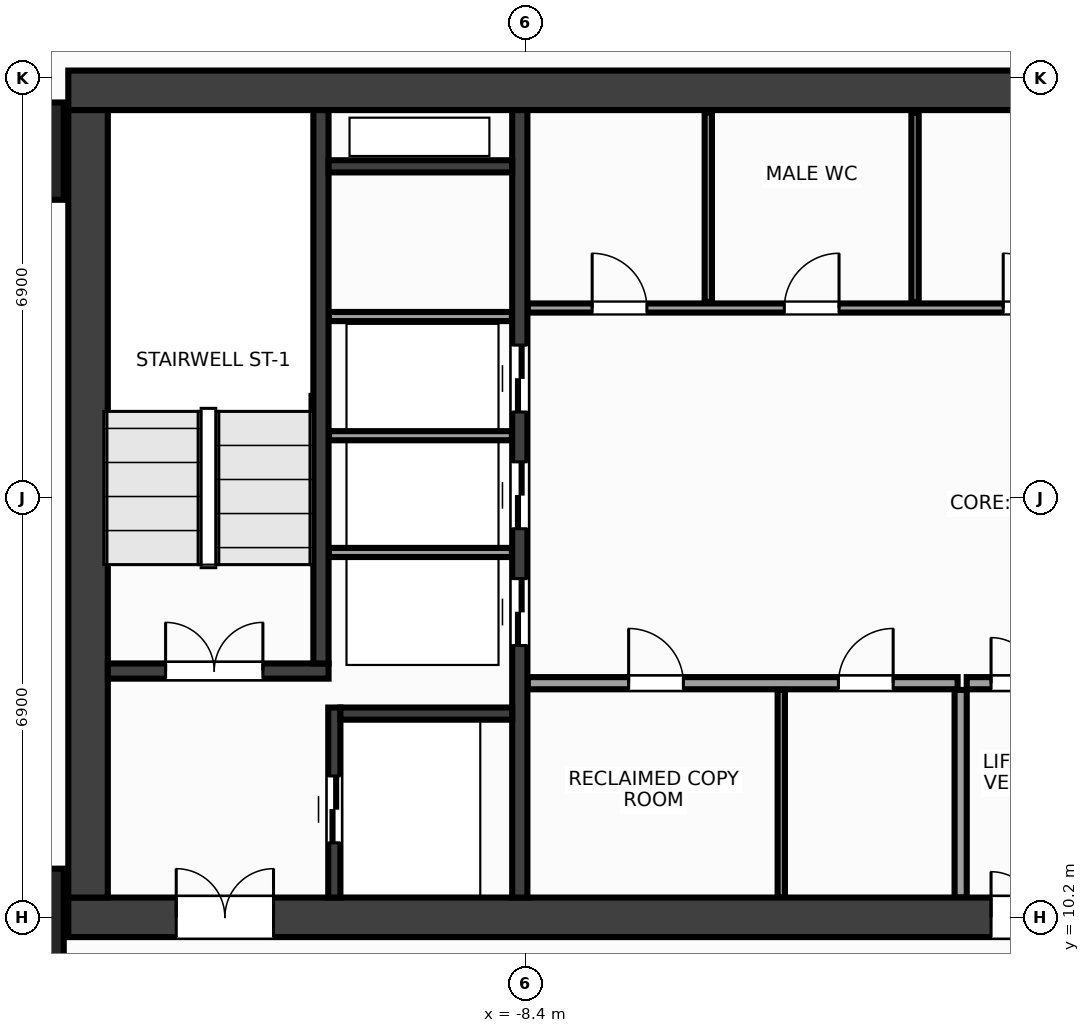
"""IFC4 building model, lengths in metres.
Left out: names, types, materials, properties, quantities, classifications, styles, units other than length and angle.
Written with IfcOpenShell. Run it as: python <this file> out.ifc"""

import sys

from ifc_helpers import new_model, si_unit, direction, frame, frame_2d, origin, origin_2d, place, context, subcontext, project, spatial, rectangle, extrude, source, transform, mapped, element, fill, save


model = new_model("IFC4")
c1 = context("Model", 3, precision=1e-05, world=origin(), true_north=direction((0.0, 1.0)))
c2 = subcontext(c1, "Body", "Model", "MODEL_VIEW")
j1 = project(units=[si_unit("LENGTHUNIT", "METRE"), si_unit("PLANEANGLEUNIT", "RADIAN")], contexts=[c1])
p1 = place(None, origin())
s1 = spatial("IfcSite", under=j1, at=p1, CompositionType="ELEMENT")
p2 = place(p1, origin())
s2 = spatial("IfcBuilding", under=s1, at=p2, CompositionType="ELEMENT")
p3 = place(p2, frame((0.0, 0.0, 160.4)))
s3 = spatial("IfcBuildingStorey", under=s2, at=p3, CompositionType="ELEMENT", Elevation=160.4)
m1 = source(origin(), c2, "Body", "SweptSolid", [
    extrude(rectangle(XDim=31.85, YDim=0.65, at=frame_2d((15.925, 0.0))), origin(), (0.0, 0.0, 1.0), 3.6),
])
p4 = place(p3, frame((-15.925, 23.8, 0.0), z_axis=(0.0, 0.0, 1.0), x_axis=(1.0, 0.0, 0.0)))
e1 = element("IfcWall", 1, at=p4, inside=s3, PredefinedType="SHEAR", context=c2, shape_type="MappedRepresentation", body=[
    mapped(m1, transform((0.0, 0.0, 0.0), x_axis=(1.0, 0.0, 0.0), y_axis=(0.0, 1.0, 0.0), z_axis=(0.0, 0.0, 1.0), scale=1.0)),
])
p5 = place(p3, frame((-15.925, 10.2, 0.0), z_axis=(0.0, 0.0, 1.0), x_axis=(1.0, 0.0, 0.0)))
e2 = element("IfcWall", 2, at=p5, inside=s3, PredefinedType="SHEAR", context=c2, shape_type="MappedRepresentation", body=[
    mapped(m1, transform((0.0, 0.0, 0.0), x_axis=(1.0, 0.0, 0.0), y_axis=(0.0, 1.0, 0.0), z_axis=(0.0, 0.0, 1.0), scale=1.0)),
])
p6 = place(p5, frame((1.775, 0.0, 0.0)))
e3 = element("IfcOpeningElement", 3, at=p6, cuts=e2, PredefinedType="OPENING", context=c2, shape_type="SweptSolid", body=[
    extrude(rectangle(XDim=1.6, YDim=2.15, at=frame_2d((0.8, 1.075))), frame((0.0, 0.337, 0.0), z_axis=(0.0, -1.0, 0.0), x_axis=(1.0, 0.0, 0.0)), (0.0, 0.0, 1.0), 0.674),
])
p7 = place(p5, frame((28.475, 0.0, 0.0)))
e4 = element("IfcOpeningElement", 4, at=p7, cuts=e2, PredefinedType="OPENING", context=c2, shape_type="SweptSolid", body=[
    extrude(rectangle(XDim=1.6, YDim=2.15, at=frame_2d((0.8, 1.075))), frame((0.0, 0.337, 0.0), z_axis=(0.0, -1.0, 0.0), x_axis=(1.0, 0.0, 0.0)), (0.0, 0.0, 1.0), 0.674),
])
p8 = place(p5, frame((15.175, 0.0, 0.0)))
e5 = element("IfcOpeningElement", 5, at=p8, cuts=e2, PredefinedType="OPENING", context=c2, shape_type="SweptSolid", body=[
    extrude(rectangle(XDim=1.5, YDim=2.2, at=frame_2d((0.75, 1.1))), frame((0.0, 0.337, 0.0), z_axis=(0.0, -1.0, 0.0), x_axis=(1.0, 0.0, 0.0)), (0.0, 0.0, 1.0), 0.674),
])
m2 = source(origin(), c2, "Body", "SweptSolid", [
    extrude(rectangle(XDim=12.95, YDim=0.65, at=frame_2d((6.475, 0.0))), origin(), (0.0, 0.0, 1.0), 3.6),
])
p9 = place(p3, frame((-15.6, 10.525, 0.0), z_axis=(0.0, 0.0, 1.0), x_axis=(0.0, 1.0, 0.0)))
e6 = element("IfcWall", 6, at=p9, inside=s3, PredefinedType="SHEAR", context=c2, shape_type="MappedRepresentation", body=[
    mapped(m2, transform((0.0, 0.0, 0.0), x_axis=(1.0, 0.0, 0.0), y_axis=(0.0, 1.0, 0.0), z_axis=(0.0, 0.0, 1.0), scale=1.0)),
])
m3 = source(origin(), c2, "Body", "SweptSolid", [
    extrude(rectangle(XDim=12.95, YDim=0.25, at=frame_2d((6.475, 0.0))), origin(), (0.0, 0.0, 1.0), 3.6),
])
p10 = place(p3, frame((-8.5, 10.525, 0.0), z_axis=(0.0, 0.0, 1.0), x_axis=(0.0, 1.0, 0.0)))
e7 = element("IfcWall", 7, at=p10, inside=s3, PredefinedType="SHEAR", context=c2, shape_type="MappedRepresentation", body=[
    mapped(m3, transform((0.0, 0.0, 0.0), x_axis=(1.0, 0.0, 0.0), y_axis=(0.0, 1.0, 0.0), z_axis=(0.0, 0.0, 1.0), scale=1.0)),
])
p11 = place(p10, frame((4.145, 0.0, 0.0)))
e8 = element("IfcOpeningElement", 8, at=p11, cuts=e7, PredefinedType="OPENING", context=c2, shape_type="SweptSolid", body=[
    extrude(rectangle(XDim=1.1, YDim=2.15, at=frame_2d((0.55, 1.075))), frame((0.0, 0.137, 0.0), z_axis=(0.0, -1.0, 0.0), x_axis=(1.0, 0.0, 0.0)), (0.0, 0.0, 1.0), 0.274),
])
p12 = place(p10, frame((6.065, 0.0, 0.0)))
e9 = element("IfcOpeningElement", 9, at=p12, cuts=e7, PredefinedType="OPENING", context=c2, shape_type="SweptSolid", body=[
    extrude(rectangle(XDim=1.1, YDim=2.15, at=frame_2d((0.55, 1.075))), frame((0.0, 0.137, 0.0), z_axis=(0.0, -1.0, 0.0), x_axis=(1.0, 0.0, 0.0)), (0.0, 0.0, 1.0), 0.274),
])
p13 = place(p10, frame((7.985, 0.0, 0.0)))
e10 = element("IfcOpeningElement", 10, at=p13, cuts=e7, PredefinedType="OPENING", context=c2, shape_type="SweptSolid", body=[
    extrude(rectangle(XDim=1.1, YDim=2.15, at=frame_2d((0.55, 1.075))), frame((0.0, 0.137, 0.0), z_axis=(0.0, -1.0, 0.0), x_axis=(1.0, 0.0, 0.0)), (0.0, 0.0, 1.0), 0.274),
])
m4 = source(origin(), c2, "Body", "SweptSolid", [
    extrude(rectangle(XDim=3.63, YDim=0.25, at=frame_2d((1.815, 0.0))), origin(), (0.0, 0.0, 1.0), 3.6),
])
p14 = place(p3, frame((-15.275, 14.25, 0.0), z_axis=(0.0, 0.0, 1.0), x_axis=(1.0, 0.0, 0.0)))
e11 = element("IfcWall", 11, at=p14, inside=s3, PredefinedType="SHEAR", context=c2, shape_type="MappedRepresentation", body=[
    mapped(m4, transform((0.0, 0.0, 0.0), x_axis=(1.0, 0.0, 0.0), y_axis=(0.0, 1.0, 0.0), z_axis=(0.0, 0.0, 1.0), scale=1.0)),
])
p15 = place(p14, frame((0.95, 0.0, 0.0)))
e12 = element("IfcOpeningElement", 12, at=p15, cuts=e11, PredefinedType="OPENING", context=c2, shape_type="SweptSolid", body=[
    extrude(rectangle(XDim=1.6, YDim=2.15, at=frame_2d((0.8, 1.075))), frame((0.0, 0.137, 0.0), z_axis=(0.0, -1.0, 0.0), x_axis=(1.0, 0.0, 0.0)), (0.0, 0.0, 1.0), 0.274),
])
m5 = source(origin(), c2, "Body", "SweptSolid", [
    extrude(rectangle(XDim=9.1, YDim=0.25, at=frame_2d((4.55, 0.0))), origin(), (0.0, 0.0, 1.0), 3.6),
])
p16 = place(p3, frame((-11.77, 14.375, 0.0), z_axis=(0.0, 0.0, 1.0), x_axis=(0.0, 1.0, 0.0)))
e13 = element("IfcWall", 13, at=p16, inside=s3, PredefinedType="SHEAR", context=c2, shape_type="MappedRepresentation", body=[
    mapped(m5, transform((0.0, 0.0, 0.0), x_axis=(1.0, 0.0, 0.0), y_axis=(0.0, 1.0, 0.0), z_axis=(0.0, 0.0, 1.0), scale=1.0)),
])
m6 = source(origin(), c2, "Body", "SweptSolid", [
    extrude(rectangle(XDim=3.125, YDim=0.2, at=frame_2d((1.562, 0.0))), origin(), (0.0, 0.0, 1.0), 3.6),
])
p17 = place(p3, frame((-11.55, 10.525, 0.0), z_axis=(0.0, 0.0, 1.0), x_axis=(0.0, 1.0, 0.0)))
e14 = element("IfcWall", 14, at=p17, inside=s3, PredefinedType="SHEAR", context=c2, shape_type="MappedRepresentation", body=[
    mapped(m6, transform((0.0, 0.0, 0.0), x_axis=(1.0, 0.0, 0.0), y_axis=(0.0, 1.0, 0.0), z_axis=(0.0, 0.0, 1.0), scale=1.0)),
])
p18 = place(p17, frame((0.9, 0.0, 0.0)))
e15 = element("IfcOpeningElement", 15, at=p18, cuts=e14, PredefinedType="OPENING", context=c2, shape_type="SweptSolid", body=[
    extrude(rectangle(XDim=1.1, YDim=2.15, at=frame_2d((0.55, 1.075))), frame((0.0, 0.112, 0.0), z_axis=(0.0, -1.0, 0.0), x_axis=(1.0, 0.0, 0.0)), (0.0, 0.0, 1.0), 0.224),
])
m7 = source(origin(), c2, "Body", "SweptSolid", [
    extrude(rectangle(XDim=2.825, YDim=0.2, at=frame_2d((1.413, 0.0))), origin(), (0.0, 0.0, 1.0), 3.6),
])
p19 = place(p3, frame((-11.45, 13.55, 0.0), z_axis=(0.0, 0.0, 1.0), x_axis=(1.0, 0.0, 0.0)))
e16 = element("IfcWall", 16, at=p19, inside=s3, PredefinedType="SHEAR", context=c2, shape_type="MappedRepresentation", body=[
    mapped(m7, transform((0.0, 0.0, 0.0), x_axis=(1.0, 0.0, 0.0), y_axis=(0.0, 1.0, 0.0), z_axis=(0.0, 0.0, 1.0), scale=1.0)),
])
m8 = source(origin(), c2, "Body", "SweptSolid", [
    extrude(rectangle(XDim=3.02, YDim=0.2, at=frame_2d((1.51, 0.0))), origin(), (0.0, 0.0, 1.0), 3.6),
])
p20 = place(p3, frame((-11.645, 22.55, 0.0), z_axis=(0.0, 0.0, 1.0), x_axis=(1.0, 0.0, 0.0)))
e17 = element("IfcWall", 17, at=p20, inside=s3, PredefinedType="SHEAR", context=c2, shape_type="MappedRepresentation", body=[
    mapped(m8, transform((0.0, 0.0, 0.0), x_axis=(1.0, 0.0, 0.0), y_axis=(0.0, 1.0, 0.0), z_axis=(0.0, 0.0, 1.0), scale=1.0)),
])
m9 = source(origin(), c2, "Body", "SweptSolid", [
    extrude(rectangle(XDim=1.6, YDim=1.6, at=origin_2d()), origin(), (0.0, 0.0, 1.0), 3.6),
])
for number, where, z_axis, x_axis in (
    (18, (-16.8, 10.2, 0.0), (0.0, 0.0, 1.0), (1.0, 0.0, 0.0)),
    (19, (-16.8, 22.8, 0.0), (0.0, 0.0, 1.0), (1.0, 0.0, 0.0)),
):
    element("IfcColumn", number, at=place(p3, frame(where, z_axis=z_axis, x_axis=x_axis)), inside=s3, PredefinedType="COLUMN", context=c2, shape_type="MappedRepresentation", body=[
        mapped(m9, transform((0.0, 0.0, 0.0), x_axis=(1.0, 0.0, 0.0), y_axis=(0.0, 1.0, 0.0), z_axis=(0.0, 0.0, 1.0), scale=1.0)),
    ])
m10 = source(origin(), c2, "Body", "SweptSolid", [
    extrude(rectangle(XDim=3.01, YDim=0.15, at=frame_2d((1.505, 0.0))), origin(), (0.0, 0.0, 1.0), 3.38),
])
for number, where, z_axis, x_axis in (
    (20, (-11.64, 16.2, 0.0), (0.0, 0.0, 1.0), (1.0, 0.0, 0.0)),
    (21, (-11.64, 18.12, 0.0), (0.0, 0.0, 1.0), (1.0, 0.0, 0.0)),
    (22, (-11.64, 20.08, 0.0), (0.0, 0.0, 1.0), (1.0, 0.0, 0.0)),
):
    element("IfcWall", number, at=place(p3, frame(where, z_axis=z_axis, x_axis=x_axis)), inside=s3, PredefinedType="PARTITIONING", context=c2, shape_type="MappedRepresentation", body=[
        mapped(m10, transform((0.0, 0.0, 0.0), x_axis=(1.0, 0.0, 0.0), y_axis=(0.0, 1.0, 0.0), z_axis=(0.0, 0.0, 1.0), scale=1.0)),
    ])
m11 = source(origin(), c2, "Body", "SweptSolid", [
    extrude(rectangle(XDim=7.07, YDim=0.2, at=frame_2d((3.535, 0.0))), origin(), (0.0, 0.0, 1.0), 3.38),
])
p21 = place(p3, frame((-8.37, 14.05, 0.0), z_axis=(0.0, 0.0, 1.0), x_axis=(1.0, 0.0, 0.0)))
e23 = element("IfcWall", 23, at=p21, inside=s3, PredefinedType="PARTITIONING", context=c2, shape_type="MappedRepresentation", body=[
    mapped(m11, transform((0.0, 0.0, 0.0), x_axis=(1.0, 0.0, 0.0), y_axis=(0.0, 1.0, 0.0), z_axis=(0.0, 0.0, 1.0), scale=1.0)),
])
p22 = place(p21, frame((1.66, 0.0, 0.0)))
e24 = element("IfcOpeningElement", 24, at=p22, cuts=e23, PredefinedType="OPENING", context=c2, shape_type="SweptSolid", body=[
    extrude(rectangle(XDim=0.9, YDim=2.15, at=frame_2d((0.45, 1.075))), frame((0.0, 0.112, 0.0), z_axis=(0.0, -1.0, 0.0), x_axis=(1.0, 0.0, 0.0)), (0.0, 0.0, 1.0), 0.224),
])
p23 = place(p21, frame((5.11, 0.0, 0.0)))
e25 = element("IfcOpeningElement", 25, at=p23, cuts=e23, PredefinedType="OPENING", context=c2, shape_type="SweptSolid", body=[
    extrude(rectangle(XDim=0.9, YDim=2.15, at=frame_2d((0.45, 1.075))), frame((0.0, 0.112, 0.0), z_axis=(0.0, -1.0, 0.0), x_axis=(1.0, 0.0, 0.0)), (0.0, 0.0, 1.0), 0.224),
])
m12 = source(origin(), c2, "Body", "SweptSolid", [
    extrude(rectangle(XDim=3.415, YDim=0.2, at=frame_2d((1.708, 0.0))), origin(), (0.0, 0.0, 1.0), 3.38),
])
p24 = place(p3, frame((-1.25, 10.525, 0.0), z_axis=(0.0, 0.0, 1.0), x_axis=(0.0, 1.0, 0.0)))
e26 = element("IfcWall", 26, at=p24, inside=s3, PredefinedType="PARTITIONING", context=c2, shape_type="MappedRepresentation", body=[
    mapped(m12, transform((0.0, 0.0, 0.0), x_axis=(1.0, 0.0, 0.0), y_axis=(0.0, 1.0, 0.0), z_axis=(0.0, 0.0, 1.0), scale=1.0)),
])
m13 = source(origin(), c2, "Body", "SweptSolid", [
    extrude(rectangle(XDim=2.3, YDim=0.2, at=frame_2d((1.15, 0.0))), origin(), (0.0, 0.0, 1.0), 3.38),
])
p25 = place(p3, frame((-1.15, 14.05, 0.0), z_axis=(0.0, 0.0, 1.0), x_axis=(1.0, 0.0, 0.0)))
e27 = element("IfcWall", 27, at=p25, inside=s3, PredefinedType="PARTITIONING", context=c2, shape_type="MappedRepresentation", body=[
    mapped(m13, transform((0.0, 0.0, 0.0), x_axis=(1.0, 0.0, 0.0), y_axis=(0.0, 1.0, 0.0), z_axis=(0.0, 0.0, 1.0), scale=1.0)),
])
p26 = place(p25, frame((0.4, 0.0, 0.0)))
e28 = element("IfcOpeningElement", 28, at=p26, cuts=e27, PredefinedType="OPENING", context=c2, shape_type="SweptSolid", body=[
    extrude(rectangle(XDim=1.5, YDim=2.2, at=frame_2d((0.75, 1.1))), frame((0.0, 0.112, 0.0), z_axis=(0.0, -1.0, 0.0), x_axis=(1.0, 0.0, 0.0)), (0.0, 0.0, 1.0), 0.224),
])
m14 = source(origin(), c2, "Body", "SweptSolid", [
    extrude(rectangle(XDim=14.59, YDim=0.15, at=frame_2d((7.295, 0.0))), origin(), (0.0, 0.0, 1.0), 3.38),
])
p27 = place(p3, frame((-8.37, 20.22, 0.0), z_axis=(0.0, 0.0, 1.0), x_axis=(1.0, 0.0, 0.0)))
e29 = element("IfcWall", 29, at=p27, inside=s3, PredefinedType="PARTITIONING", context=c2, shape_type="MappedRepresentation", body=[
    mapped(m14, transform((0.0, 0.0, 0.0), x_axis=(1.0, 0.0, 0.0), y_axis=(0.0, 1.0, 0.0), z_axis=(0.0, 0.0, 1.0), scale=1.0)),
])
p28 = place(p27, frame((1.06, 0.0, 0.0)))
e30 = element("IfcOpeningElement", 30, at=p28, cuts=e29, PredefinedType="OPENING", context=c2, shape_type="SweptSolid", body=[
    extrude(rectangle(XDim=0.9, YDim=2.15, at=frame_2d((0.45, 1.075))), frame((0.0, 0.087, 0.0), z_axis=(0.0, -1.0, 0.0), x_axis=(1.0, 0.0, 0.0)), (0.0, 0.0, 1.0), 0.174),
])
p29 = place(p27, frame((4.22, 0.0, 0.0)))
e31 = element("IfcOpeningElement", 31, at=p29, cuts=e29, PredefinedType="OPENING", context=c2, shape_type="SweptSolid", body=[
    extrude(rectangle(XDim=0.9, YDim=2.15, at=frame_2d((0.45, 1.075))), frame((0.0, 0.087, 0.0), z_axis=(0.0, -1.0, 0.0), x_axis=(1.0, 0.0, 0.0)), (0.0, 0.0, 1.0), 0.174),
])
p30 = place(p27, frame((7.82, 0.0, 0.0)))
e32 = element("IfcOpeningElement", 32, at=p30, cuts=e29, PredefinedType="OPENING", context=c2, shape_type="SweptSolid", body=[
    extrude(rectangle(XDim=0.9, YDim=2.15, at=frame_2d((0.45, 1.075))), frame((0.0, 0.087, 0.0), z_axis=(0.0, -1.0, 0.0), x_axis=(1.0, 0.0, 0.0)), (0.0, 0.0, 1.0), 0.174),
])
p31 = place(p27, frame((11.87, 0.0, 0.0)))
e33 = element("IfcOpeningElement", 33, at=p31, cuts=e29, PredefinedType="OPENING", context=c2, shape_type="SweptSolid", body=[
    extrude(rectangle(XDim=0.9, YDim=2.15, at=frame_2d((0.45, 1.075))), frame((0.0, 0.087, 0.0), z_axis=(0.0, -1.0, 0.0), x_axis=(1.0, 0.0, 0.0)), (0.0, 0.0, 1.0), 0.174),
])
m15 = source(origin(), c2, "Body", "SweptSolid", [
    extrude(rectangle(XDim=3.415, YDim=0.12, at=frame_2d((1.708, 0.0))), origin(), (0.0, 0.0, 1.0), 3.38),
])
p32 = place(p3, frame((-4.2, 10.525, 0.0), z_axis=(0.0, 0.0, 1.0), x_axis=(0.0, 1.0, 0.0)))
e34 = element("IfcWall", 34, at=p32, inside=s3, PredefinedType="PARTITIONING", context=c2, shape_type="MappedRepresentation", body=[
    mapped(m15, transform((0.0, 0.0, 0.0), x_axis=(1.0, 0.0, 0.0), y_axis=(0.0, 1.0, 0.0), z_axis=(0.0, 0.0, 1.0), scale=1.0)),
])
m16 = source(origin(), c2, "Body", "SweptSolid", [
    extrude(rectangle(XDim=3.115, YDim=0.12, at=frame_2d((1.558, 0.0))), origin(), (0.0, 0.0, 1.0), 3.38),
])
for number, where, z_axis, x_axis in (
    (35, (-5.4, 20.32, 0.0), (0.0, 0.0, 1.0), (0.0, 1.0, 0.0)),
    (36, (-2.0, 20.32, 0.0), (0.0, 0.0, 1.0), (0.0, 1.0, 0.0)),
):
    element("IfcWall", number, at=place(p3, frame(where, z_axis=z_axis, x_axis=x_axis)), inside=s3, PredefinedType="PARTITIONING", context=c2, shape_type="MappedRepresentation", body=[
        mapped(m16, transform((0.0, 0.0, 0.0), x_axis=(1.0, 0.0, 0.0), y_axis=(0.0, 1.0, 0.0), z_axis=(0.0, 0.0, 1.0), scale=1.0)),
    ])
m17 = source(origin(), c2, "Body", "SweptSolid", [
    extrude(rectangle(XDim=1.6, YDim=2.15, at=frame_2d((0.8, 1.075))), frame((0.0, 0.025, 0.0), z_axis=(0.0, -1.0, 0.0), x_axis=(1.0, 0.0, 0.0)), (0.0, 0.0, 1.0), 0.05),
])
p33 = place(p15, origin())
e37 = element("IfcDoor", 37, at=p33, inside=s3, OperationType="DOUBLE_DOOR_SINGLE_SWING", PredefinedType="DOOR", context=c2, shape_type="MappedRepresentation", body=[
    mapped(m17, transform((0.0, 0.0, 0.0), x_axis=(1.0, 0.0, 0.0), y_axis=(0.0, 1.0, 0.0), z_axis=(0.0, 0.0, 1.0), scale=1.0)),
])
fill(e12, e37)
p34 = place(p6, origin())
e38 = element("IfcDoor", 38, at=p34, inside=s3, OperationType="DOUBLE_DOOR_SINGLE_SWING", PredefinedType="DOOR", context=c2, shape_type="MappedRepresentation", body=[
    mapped(m17, transform((0.0, 0.0, 0.0), x_axis=(1.0, 0.0, 0.0), y_axis=(0.0, 1.0, 0.0), z_axis=(0.0, 0.0, 1.0), scale=1.0)),
])
fill(e3, e38)
m18 = source(origin(), c2, "Body", "SweptSolid", [
    extrude(rectangle(XDim=1.1, YDim=2.15, at=frame_2d((0.55, 1.075))), frame((0.0, 0.025, 0.0), z_axis=(0.0, -1.0, 0.0), x_axis=(1.0, 0.0, 0.0)), (0.0, 0.0, 1.0), 0.05),
])
p35 = place(p18, origin())
e39 = element("IfcDoor", 39, at=p35, inside=s3, OperationType="DOUBLE_DOOR_SLIDING", PredefinedType="DOOR", context=c2, shape_type="MappedRepresentation", body=[
    mapped(m18, transform((0.0, 0.0, 0.0), x_axis=(1.0, 0.0, 0.0), y_axis=(0.0, 1.0, 0.0), z_axis=(0.0, 0.0, 1.0), scale=1.0)),
])
fill(e15, e39)
p36 = place(p11, origin())
e40 = element("IfcDoor", 40, at=p36, inside=s3, OperationType="DOUBLE_DOOR_SLIDING", PredefinedType="DOOR", context=c2, shape_type="MappedRepresentation", body=[
    mapped(m18, transform((0.0, 0.0, 0.0), x_axis=(1.0, 0.0, 0.0), y_axis=(0.0, 1.0, 0.0), z_axis=(0.0, 0.0, 1.0), scale=1.0)),
])
fill(e8, e40)
p37 = place(p12, origin())
e41 = element("IfcDoor", 41, at=p37, inside=s3, OperationType="DOUBLE_DOOR_SLIDING", PredefinedType="DOOR", context=c2, shape_type="MappedRepresentation", body=[
    mapped(m18, transform((0.0, 0.0, 0.0), x_axis=(1.0, 0.0, 0.0), y_axis=(0.0, 1.0, 0.0), z_axis=(0.0, 0.0, 1.0), scale=1.0)),
])
fill(e9, e41)
p38 = place(p13, origin())
e42 = element("IfcDoor", 42, at=p38, inside=s3, OperationType="DOUBLE_DOOR_SLIDING", PredefinedType="DOOR", context=c2, shape_type="MappedRepresentation", body=[
    mapped(m18, transform((0.0, 0.0, 0.0), x_axis=(1.0, 0.0, 0.0), y_axis=(0.0, 1.0, 0.0), z_axis=(0.0, 0.0, 1.0), scale=1.0)),
])
fill(e10, e42)
m19 = source(origin(), c2, "Body", "SweptSolid", [
    extrude(rectangle(XDim=0.9, YDim=2.15, at=frame_2d((0.45, 1.075))), frame((0.0, 0.025, 0.0), z_axis=(0.0, -1.0, 0.0), x_axis=(1.0, 0.0, 0.0)), (0.0, 0.0, 1.0), 0.05),
])
p39 = place(p22, origin())
e43 = element("IfcDoor", 43, at=p39, inside=s3, OperationType="SINGLE_SWING_LEFT", PredefinedType="DOOR", context=c2, shape_type="MappedRepresentation", body=[
    mapped(m19, transform((0.0, 0.0, 0.0), x_axis=(1.0, 0.0, 0.0), y_axis=(0.0, 1.0, 0.0), z_axis=(0.0, 0.0, 1.0), scale=1.0)),
])
fill(e24, e43)
p40 = place(p23, origin())
e44 = element("IfcDoor", 44, at=p40, inside=s3, OperationType="SINGLE_SWING_RIGHT", PredefinedType="DOOR", context=c2, shape_type="MappedRepresentation", body=[
    mapped(m19, transform((0.0, 0.0, 0.0), x_axis=(1.0, 0.0, 0.0), y_axis=(0.0, 1.0, 0.0), z_axis=(0.0, 0.0, 1.0), scale=1.0)),
])
fill(e25, e44)
m20 = source(origin(), c2, "Body", "SweptSolid", [
    extrude(rectangle(XDim=1.5, YDim=2.2, at=frame_2d((0.75, 1.1))), frame((0.0, 0.025, 0.0), z_axis=(0.0, -1.0, 0.0), x_axis=(1.0, 0.0, 0.0)), (0.0, 0.0, 1.0), 0.05),
])
p41 = place(p26, origin())
e45 = element("IfcDoor", 45, at=p41, inside=s3, OperationType="DOUBLE_DOOR_SINGLE_SWING", PredefinedType="DOOR", context=c2, shape_type="MappedRepresentation", body=[
    mapped(m20, transform((0.0, 0.0, 0.0), x_axis=(1.0, 0.0, 0.0), y_axis=(0.0, 1.0, 0.0), z_axis=(0.0, 0.0, 1.0), scale=1.0)),
])
fill(e28, e45)
p42 = place(p8, origin())
e46 = element("IfcDoor", 46, at=p42, inside=s3, OperationType="DOUBLE_DOOR_SINGLE_SWING", PredefinedType="DOOR", context=c2, shape_type="MappedRepresentation", body=[
    mapped(m20, transform((0.0, 0.0, 0.0), x_axis=(1.0, 0.0, 0.0), y_axis=(0.0, 1.0, 0.0), z_axis=(0.0, 0.0, 1.0), scale=1.0)),
])
fill(e5, e46)
p43 = place(p28, origin())
e47 = element("IfcDoor", 47, at=p43, inside=s3, OperationType="SINGLE_SWING_LEFT", PredefinedType="DOOR", context=c2, shape_type="MappedRepresentation", body=[
    mapped(m19, transform((0.0, 0.0, 0.0), x_axis=(1.0, 0.0, 0.0), y_axis=(0.0, 1.0, 0.0), z_axis=(0.0, 0.0, 1.0), scale=1.0)),
])
fill(e30, e47)
p44 = place(p29, origin())
e48 = element("IfcDoor", 48, at=p44, inside=s3, OperationType="SINGLE_SWING_RIGHT", PredefinedType="DOOR", context=c2, shape_type="MappedRepresentation", body=[
    mapped(m19, transform((0.0, 0.0, 0.0), x_axis=(1.0, 0.0, 0.0), y_axis=(0.0, 1.0, 0.0), z_axis=(0.0, 0.0, 1.0), scale=1.0)),
])
fill(e31, e48)
p45 = place(p30, origin())
e49 = element("IfcDoor", 49, at=p45, inside=s3, OperationType="SINGLE_SWING_LEFT", PredefinedType="DOOR", context=c2, shape_type="MappedRepresentation", body=[
    mapped(m19, transform((0.0, 0.0, 0.0), x_axis=(1.0, 0.0, 0.0), y_axis=(0.0, 1.0, 0.0), z_axis=(0.0, 0.0, 1.0), scale=1.0)),
])
fill(e32, e49)
save(model, sys.argv[1])
